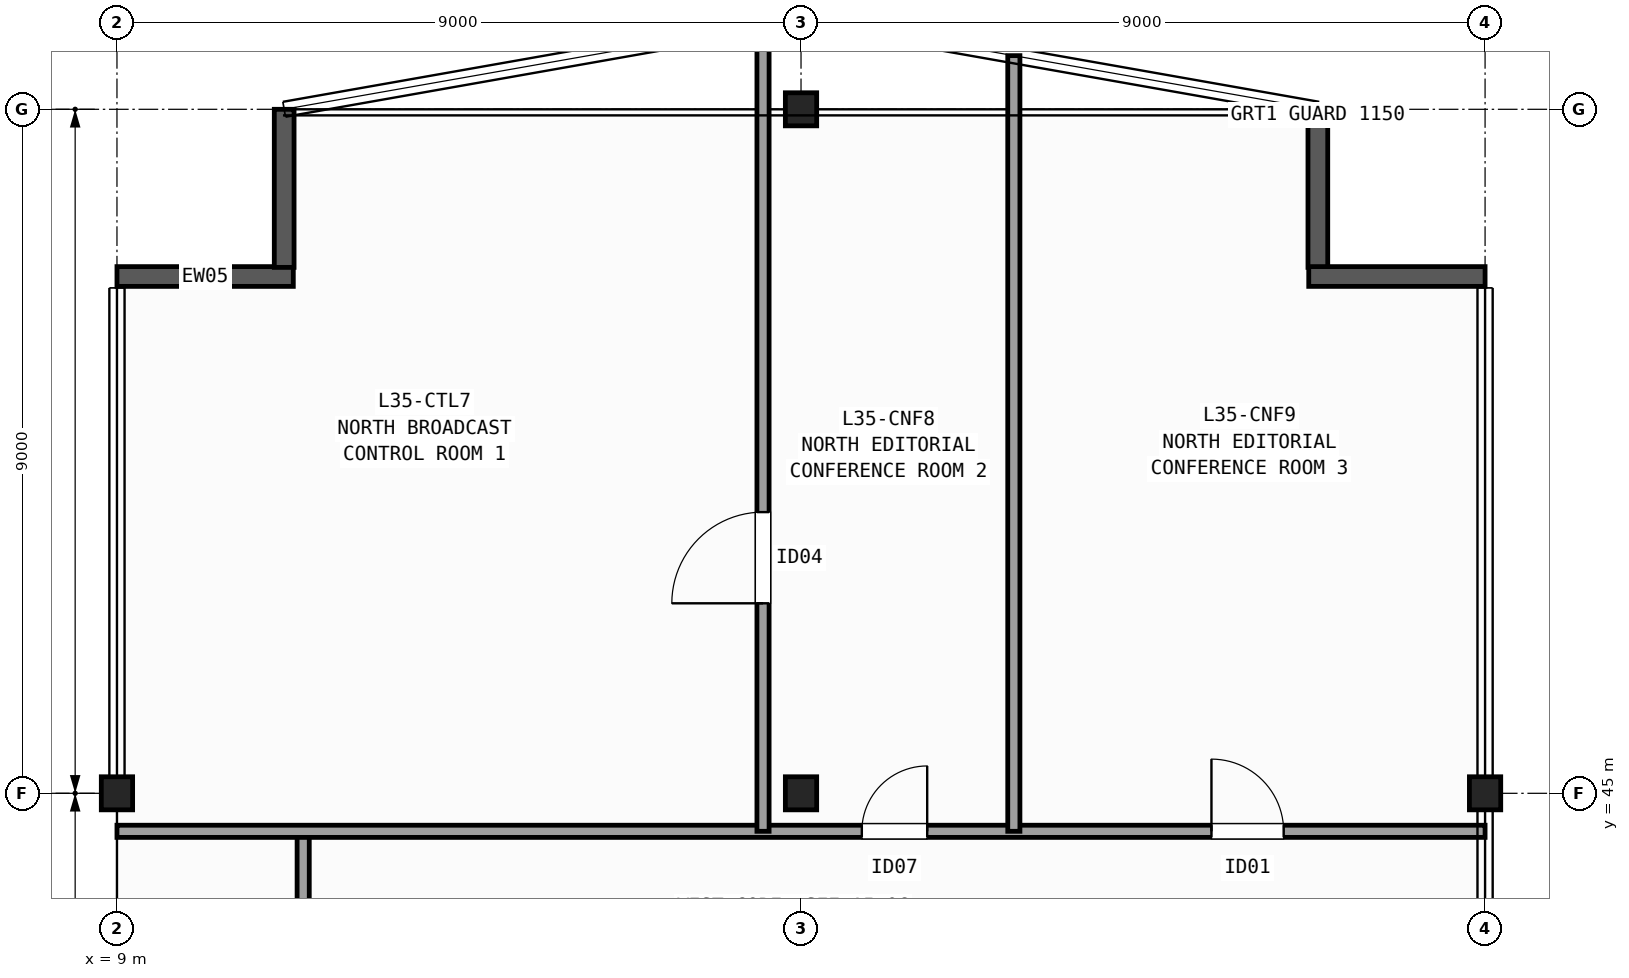
"""IFC4 building model, lengths in metres.
Left out: names, types, materials, properties, quantities, classifications, styles, units other than length and angle.
Written with IfcOpenShell. Run it as: python <this file> out.ifc"""

import sys

from ifc_helpers import new_model, si_unit, direction, frame, frame_2d, origin, origin_2d, place, context, subcontext, project, spatial, rectangle, i_section, extrude, element, fill, save


model = new_model("IFC4")
c1 = context("Model", 3, precision=1e-05, world=origin(), true_north=direction((0.0, 1.0)))
c2 = subcontext(c1, "Body", "Model", "MODEL_VIEW")
j1 = project(units=[si_unit("LENGTHUNIT", "METRE"), si_unit("PLANEANGLEUNIT", "RADIAN")], contexts=[c1])
p1 = place(None, origin())
s1 = spatial("IfcSite", under=j1, at=p1, CompositionType="ELEMENT")
p2 = place(p1, origin())
s2 = spatial("IfcBuilding", under=s1, at=p2, CompositionType="ELEMENT")
p3 = place(p2, frame((0.0, 0.0, 143.3)))
s3 = spatial("IfcBuildingStorey", under=s2, at=p3, CompositionType="ELEMENT", Elevation=143.3)
for number, where, z_axis, x_axis in (
    (1, (9.0, 45.0, 0.0), (0.0, 0.0, 1.0), (1.0, 0.0, 0.0)),
    (2, (18.0, 45.0, 0.0), (0.0, 0.0, 1.0), (1.0, 0.0, 0.0)),
    (3, (18.0, 54.0, 0.0), (0.0, 0.0, 1.0), (1.0, 0.0, 0.0)),
    (4, (27.0, 45.0, 0.0), (0.0, 0.0, 1.0), (1.0, 0.0, 0.0)),
):
    element("IfcColumn", number, at=place(p3, frame(where, z_axis=z_axis, x_axis=x_axis)), inside=s3, PredefinedType="COLUMN", context=c2, shape_type="SweptSolid", body=[
        extrude(i_section(OverallWidth=0.412, OverallDepth=0.435, WebThickness=0.036, FlangeThickness=0.057, FilletRadius=0.015, at=origin_2d()), origin(), (0.0, 0.0, 1.0), 3.7),
    ])
p4 = place(p3, frame((9.0, 51.8, 0.0), z_axis=(0.0, 0.0, 1.0), x_axis=(1.0, 0.0, 0.0)))
e5 = element("IfcWall", 5, at=p4, inside=s3, PredefinedType="SOLIDWALL", context=c2, shape_type="SweptSolid", body=[
    extrude(rectangle(XDim=2.32, YDim=0.26, at=frame_2d((1.16, 0.0))), origin(), (0.0, 0.0, 1.0), 3.42),
])
for number, where, z_axis, x_axis in (
    (6, (11.2, 51.92, 0.0), (0.0, 0.0, 1.0), (0.0, 1.0, 0.0)),
    (7, (24.8, 54.0, 0.0), (0.0, 0.0, 1.0), (0.0, -1.0, 0.0)),
):
    element("IfcWall", number, at=place(p3, frame(where, z_axis=z_axis, x_axis=x_axis)), inside=s3, PredefinedType="SOLIDWALL", context=c2, shape_type="SweptSolid", body=[
        extrude(rectangle(XDim=2.08, YDim=0.26, at=frame_2d((1.04, 0.0))), origin(), (0.0, 0.0, 1.0), 3.42),
    ])
p5 = place(p3, frame((24.68, 51.8, 0.0), z_axis=(0.0, 0.0, 1.0), x_axis=(1.0, 0.0, 0.0)))
e8 = element("IfcWall", 8, at=p5, inside=s3, PredefinedType="SOLIDWALL", context=c2, shape_type="SweptSolid", body=[
    extrude(rectangle(XDim=2.32, YDim=0.26, at=frame_2d((1.16, 0.0))), origin(), (0.0, 0.0, 1.0), 3.42),
])
p6 = place(p3, frame((11.45, 42.4, 0.0), z_axis=(0.0, 0.0, 1.0), x_axis=(0.0, 1.0, 0.0)))
e9 = element("IfcWall", 9, at=p6, inside=s3, PredefinedType="PARTITIONING", context=c2, shape_type="SweptSolid", body=[
    extrude(rectangle(XDim=2.1, YDim=0.16, at=frame_2d((1.05, 0.0))), origin(), (0.0, 0.0, 1.0), 3.42),
])
p7 = place(p3, frame((9.0, 44.5, 0.0), z_axis=(0.0, 0.0, 1.0), x_axis=(1.0, 0.0, 0.0)))
e10 = element("IfcWall", 10, at=p7, inside=s3, PredefinedType="PARTITIONING", context=c2, shape_type="SweptSolid", body=[
    extrude(rectangle(XDim=18.0, YDim=0.16, at=frame_2d((9.0, 0.0))), origin(), (0.0, 0.0, 1.0), 2.634),
])
p8 = place(p7, frame((9.8, 0.0, 0.0)))
e11 = element("IfcOpeningElement", 11, at=p8, cuts=e10, PredefinedType="OPENING", context=c2, shape_type="SweptSolid", body=[
    extrude(rectangle(XDim=0.86, YDim=2.05, at=frame_2d((0.43, 1.025))), frame((0.0, 0.09, 0.0), z_axis=(0.0, -1.0, 0.0), x_axis=(1.0, 0.0, 0.0)), (0.0, 0.0, 1.0), 0.18),
])
p9 = place(p7, frame((14.4, 0.0, 0.0)))
e12 = element("IfcOpeningElement", 12, at=p9, cuts=e10, PredefinedType="OPENING", context=c2, shape_type="SweptSolid", body=[
    extrude(rectangle(XDim=0.95, YDim=2.1, at=frame_2d((0.475, 1.05))), frame((0.0, 0.09, 0.0), z_axis=(0.0, -1.0, 0.0), x_axis=(1.0, 0.0, 0.0)), (0.0, 0.0, 1.0), 0.18),
])
p10 = place(p3, frame((17.5, 44.5, 0.0), z_axis=(0.0, 0.0, 1.0), x_axis=(0.0, 1.0, 0.0)))
e13 = element("IfcWall", 13, at=p10, inside=s3, PredefinedType="PARTITIONING", context=c2, shape_type="SweptSolid", body=[
    extrude(rectangle(XDim=10.612, YDim=0.16, at=frame_2d((5.306, 0.0))), origin(), (0.0, 0.0, 1.0), 3.42),
])
p11 = place(p10, frame((3.0, 0.0, 0.0)))
e14 = element("IfcOpeningElement", 14, at=p11, cuts=e13, PredefinedType="OPENING", context=c2, shape_type="SweptSolid", body=[
    extrude(rectangle(XDim=1.2, YDim=2.15, at=frame_2d((0.6, 1.075))), frame((0.0, 0.09, 0.0), z_axis=(0.0, -1.0, 0.0), x_axis=(1.0, 0.0, 0.0)), (0.0, 0.0, 1.0), 0.18),
])
p12 = place(p3, frame((20.8, 44.5, 0.0), z_axis=(0.0, 0.0, 1.0), x_axis=(0.0, 1.0, 0.0)))
e15 = element("IfcWall", 15, at=p12, inside=s3, PredefinedType="PARTITIONING", context=c2, shape_type="SweptSolid", body=[
    extrude(rectangle(XDim=10.206, YDim=0.16, at=frame_2d((5.103, 0.0))), origin(), (0.0, 0.0, 1.0), 3.42),
])
p13 = place(p11, origin())
e16 = element("IfcDoor", 16, at=p13, inside=s3, OperationType="SINGLE_SWING_LEFT", PredefinedType="DOOR", context=c2, shape_type="SweptSolid", body=[
    extrude(rectangle(XDim=1.2, YDim=2.15, at=frame_2d((0.6, 1.075))), frame((0.0, 0.025, 0.0), z_axis=(0.0, -1.0, 0.0), x_axis=(1.0, 0.0, 0.0)), (0.0, 0.0, 1.0), 0.05),
])
fill(e14, e16)
p14 = place(p8, origin())
e17 = element("IfcDoor", 17, at=p14, inside=s3, OperationType="SINGLE_SWING_RIGHT", PredefinedType="DOOR", context=c2, shape_type="SweptSolid", body=[
    extrude(rectangle(XDim=0.86, YDim=2.05, at=frame_2d((0.43, 1.025))), frame((0.0, 0.025, 0.0), z_axis=(0.0, -1.0, 0.0), x_axis=(1.0, 0.0, 0.0)), (0.0, 0.0, 1.0), 0.05),
])
fill(e11, e17)
p15 = place(p9, origin())
e18 = element("IfcDoor", 18, at=p15, inside=s3, OperationType="SINGLE_SWING_LEFT", PredefinedType="DOOR", context=c2, shape_type="SweptSolid", body=[
    extrude(rectangle(XDim=0.95, YDim=2.1, at=frame_2d((0.475, 1.05))), frame((0.0, 0.025, 0.0), z_axis=(0.0, -1.0, 0.0), x_axis=(1.0, 0.0, 0.0)), (0.0, 0.0, 1.0), 0.05),
])
fill(e12, e18)
save(model, sys.argv[1])
